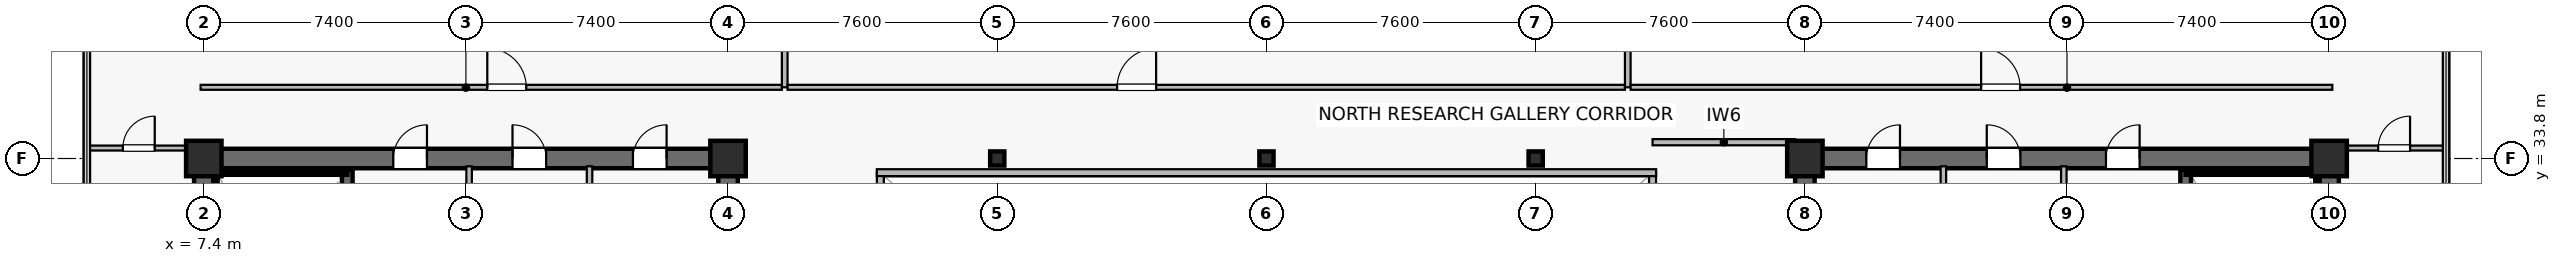
"""IFC4 building model, lengths in metres.
Left out: names, types, materials, properties, quantities, classifications, styles, units other than length and angle.
Written with IfcOpenShell. Run it as: python <this file> out.ifc"""

import sys

from ifc_helpers import new_model, si_unit, direction, frame, frame_2d, origin, origin_2d, place, context, subcontext, project, spatial, rectangle, hollow_rectangle, extrude, source, transform, mapped, element, fill, save


model = new_model("IFC4")
c1 = context("Model", 3, precision=1e-05, world=origin(), true_north=direction((0.0, 1.0)))
c2 = subcontext(c1, "Body", "Model", "MODEL_VIEW")
j1 = project(units=[si_unit("LENGTHUNIT", "METRE"), si_unit("PLANEANGLEUNIT", "RADIAN")], contexts=[c1])
p1 = place(None, origin())
s1 = spatial("IfcSite", under=j1, at=p1, CompositionType="ELEMENT")
p2 = place(p1, origin())
s2 = spatial("IfcBuilding", under=s1, at=p2, CompositionType="ELEMENT")
p3 = place(p2, frame((0.0, 0.0, 205.5)))
s3 = spatial("IfcBuildingStorey", under=s2, at=p3, CompositionType="ELEMENT", Elevation=205.5)
p4 = place(p3, frame((7.125, 33.8, 0.0), z_axis=(0.0, 0.0, 1.0), x_axis=(1.0, 0.0, 0.0)))
e1 = element("IfcWall", 1, at=p4, inside=s3, PredefinedType="SHEAR", context=c2, shape_type="SweptSolid", body=[
    extrude(rectangle(XDim=15.35, YDim=0.55, at=frame_2d((7.675, 0.0))), origin(), (0.0, 0.0, 1.0), 3.8),
])
p5 = place(p4, frame((5.625, 0.0, 0.0)))
e2 = element("IfcOpeningElement", 2, at=p5, cuts=e1, PredefinedType="OPENING", context=c2, shape_type="SweptSolid", body=[
    extrude(rectangle(XDim=0.95, YDim=2.15, at=frame_2d((0.475, 1.075))), frame((0.0, 0.285, 0.0), z_axis=(0.0, -1.0, 0.0), x_axis=(1.0, 0.0, 0.0)), (0.0, 0.0, 1.0), 0.57),
])
p6 = place(p4, frame((8.99, 0.0, 0.0)))
e3 = element("IfcOpeningElement", 3, at=p6, cuts=e1, PredefinedType="OPENING", context=c2, shape_type="SweptSolid", body=[
    extrude(rectangle(XDim=0.95, YDim=2.15, at=frame_2d((0.475, 1.075))), frame((0.0, 0.285, 0.0), z_axis=(0.0, -1.0, 0.0), x_axis=(1.0, 0.0, 0.0)), (0.0, 0.0, 1.0), 0.57),
])
p7 = place(p4, frame((12.39, 0.0, 0.0)))
e4 = element("IfcOpeningElement", 4, at=p7, cuts=e1, PredefinedType="OPENING", context=c2, shape_type="SweptSolid", body=[
    extrude(rectangle(XDim=0.95, YDim=2.15, at=frame_2d((0.475, 1.075))), frame((0.0, 0.285, 0.0), z_axis=(0.0, -1.0, 0.0), x_axis=(1.0, 0.0, 0.0)), (0.0, 0.0, 1.0), 0.57),
])
p8 = place(p3, frame((7.4, 15.075, 0.0), z_axis=(0.0, 0.0, 1.0), x_axis=(0.0, 1.0, 0.0)))
e5 = element("IfcWall", 5, at=p8, inside=s3, PredefinedType="SHEAR", context=c2, shape_type="SweptSolid", body=[
    extrude(rectangle(XDim=18.45, YDim=0.55, at=frame_2d((9.225, 0.0))), origin(), (0.0, 0.0, 1.0), 3.8),
])
p9 = place(p3, frame((22.2, 15.075, 0.0), z_axis=(0.0, 0.0, 1.0), x_axis=(0.0, 1.0, 0.0)))
e6 = element("IfcWall", 6, at=p9, inside=s3, PredefinedType="SHEAR", context=c2, shape_type="SweptSolid", body=[
    extrude(rectangle(XDim=18.45, YDim=0.55, at=frame_2d((9.225, 0.0))), origin(), (0.0, 0.0, 1.0), 3.8),
])
p10 = place(p9, frame((3.475, 0.0, 0.0)))
e7 = element("IfcOpeningElement", 7, at=p10, cuts=e6, PredefinedType="OPENING", context=c2, shape_type="SweptSolid", body=[
    extrude(rectangle(XDim=1.42, YDim=2.2, at=frame_2d((0.71, 1.1))), frame((0.0, 0.285, 0.0), z_axis=(0.0, -1.0, 0.0), x_axis=(1.0, 0.0, 0.0)), (0.0, 0.0, 1.0), 0.57),
])
p11 = place(p3, frame((11.45, 24.85, 0.0), z_axis=(0.0, 0.0, 1.0), x_axis=(0.0, 1.0, 0.0)))
e8 = element("IfcWall", 8, at=p11, inside=s3, PredefinedType="SHEAR", context=c2, shape_type="SweptSolid", body=[
    extrude(rectangle(XDim=8.63, YDim=0.3, at=frame_2d((4.315, 0.0))), origin(), (0.0, 0.0, 1.0), 3.8),
])
p12 = place(p11, frame((0.42, 0.0, 0.0)))
e9 = element("IfcOpeningElement", 9, at=p12, cuts=e8, PredefinedType="OPENING", context=c2, shape_type="SweptSolid", body=[
    extrude(rectangle(XDim=1.1, YDim=2.15, at=frame_2d((0.55, 1.075))), frame((0.0, 0.16, 0.0), z_axis=(0.0, -1.0, 0.0), x_axis=(1.0, 0.0, 0.0)), (0.0, 0.0, 1.0), 0.32),
])
p13 = place(p3, frame((7.73, 33.4, 0.0), z_axis=(0.0, 0.0, 1.0), x_axis=(1.0, 0.0, 0.0)))
e10 = element("IfcWall", 10, at=p13, inside=s3, PredefinedType="SOLIDWALL", context=c2, shape_type="SweptSolid", body=[
    extrude(rectangle(XDim=3.72, YDim=0.12, at=frame_2d((1.86, 0.0))), origin(), (0.0, 0.0, 1.0), 3.8),
])
p14 = place(p3, frame((7.73, 25.0, 0.0), z_axis=(0.0, 0.0, 1.0), x_axis=(0.0, 1.0, 0.0)))
e11 = element("IfcWall", 11, at=p14, inside=s3, PredefinedType="SOLIDWALL", context=c2, shape_type="SweptSolid", body=[
    extrude(rectangle(XDim=8.32, YDim=0.12, at=frame_2d((4.16, 0.0))), origin(), (0.0, 0.0, 1.0), 3.8),
])
p15 = place(p3, frame((52.325, 33.8, 0.0), z_axis=(0.0, 0.0, 1.0), x_axis=(1.0, 0.0, 0.0)))
e12 = element("IfcWall", 12, at=p15, inside=s3, PredefinedType="SHEAR", context=c2, shape_type="SweptSolid", body=[
    extrude(rectangle(XDim=15.35, YDim=0.55, at=frame_2d((7.675, 0.0))), origin(), (0.0, 0.0, 1.0), 3.8),
])
p16 = place(p15, frame((8.775, 0.0, 0.0)))
e13 = element("IfcOpeningElement", 13, at=p16, cuts=e12, PredefinedType="OPENING", context=c2, shape_type="SweptSolid", body=[
    extrude(rectangle(XDim=0.95, YDim=2.15, at=frame_2d((0.475, 1.075))), frame((0.0, 0.285, 0.0), z_axis=(0.0, -1.0, 0.0), x_axis=(1.0, 0.0, 0.0)), (0.0, 0.0, 1.0), 0.57),
])
p17 = place(p15, frame((5.41, 0.0, 0.0)))
e14 = element("IfcOpeningElement", 14, at=p17, cuts=e12, PredefinedType="OPENING", context=c2, shape_type="SweptSolid", body=[
    extrude(rectangle(XDim=0.95, YDim=2.15, at=frame_2d((0.475, 1.075))), frame((0.0, 0.285, 0.0), z_axis=(0.0, -1.0, 0.0), x_axis=(1.0, 0.0, 0.0)), (0.0, 0.0, 1.0), 0.57),
])
p18 = place(p15, frame((2.01, 0.0, 0.0)))
e15 = element("IfcOpeningElement", 15, at=p18, cuts=e12, PredefinedType="OPENING", context=c2, shape_type="SweptSolid", body=[
    extrude(rectangle(XDim=0.95, YDim=2.15, at=frame_2d((0.475, 1.075))), frame((0.0, 0.285, 0.0), z_axis=(0.0, -1.0, 0.0), x_axis=(1.0, 0.0, 0.0)), (0.0, 0.0, 1.0), 0.57),
])
p19 = place(p3, frame((52.6, 15.075, 0.0), z_axis=(0.0, 0.0, 1.0), x_axis=(0.0, 1.0, 0.0)))
e16 = element("IfcWall", 16, at=p19, inside=s3, PredefinedType="SHEAR", context=c2, shape_type="SweptSolid", body=[
    extrude(rectangle(XDim=18.45, YDim=0.55, at=frame_2d((9.225, 0.0))), origin(), (0.0, 0.0, 1.0), 3.8),
])
p20 = place(p19, frame((3.475, 0.0, 0.0)))
e17 = element("IfcOpeningElement", 17, at=p20, cuts=e16, PredefinedType="OPENING", context=c2, shape_type="SweptSolid", body=[
    extrude(rectangle(XDim=1.42, YDim=2.2, at=frame_2d((0.71, 1.1))), frame((0.0, 0.285, 0.0), z_axis=(0.0, -1.0, 0.0), x_axis=(1.0, 0.0, 0.0)), (0.0, 0.0, 1.0), 0.57),
])
p21 = place(p3, frame((67.4, 15.075, 0.0), z_axis=(0.0, 0.0, 1.0), x_axis=(0.0, 1.0, 0.0)))
e18 = element("IfcWall", 18, at=p21, inside=s3, PredefinedType="SHEAR", context=c2, shape_type="SweptSolid", body=[
    extrude(rectangle(XDim=18.45, YDim=0.55, at=frame_2d((9.225, 0.0))), origin(), (0.0, 0.0, 1.0), 3.8),
])
p22 = place(p3, frame((63.35, 24.85, 0.0), z_axis=(0.0, 0.0, 1.0), x_axis=(0.0, 1.0, 0.0)))
e19 = element("IfcWall", 19, at=p22, inside=s3, PredefinedType="SHEAR", context=c2, shape_type="SweptSolid", body=[
    extrude(rectangle(XDim=8.63, YDim=0.3, at=frame_2d((4.315, 0.0))), origin(), (0.0, 0.0, 1.0), 3.8),
])
p23 = place(p22, frame((0.42, 0.0, 0.0)))
e20 = element("IfcOpeningElement", 20, at=p23, cuts=e19, PredefinedType="OPENING", context=c2, shape_type="SweptSolid", body=[
    extrude(rectangle(XDim=1.1, YDim=2.15, at=frame_2d((0.55, 1.075))), frame((0.0, 0.16, 0.0), z_axis=(0.0, -1.0, 0.0), x_axis=(1.0, 0.0, 0.0)), (0.0, 0.0, 1.0), 0.32),
])
p24 = place(p3, frame((63.35, 33.4, 0.0), z_axis=(0.0, 0.0, 1.0), x_axis=(1.0, 0.0, 0.0)))
e21 = element("IfcWall", 21, at=p24, inside=s3, PredefinedType="SOLIDWALL", context=c2, shape_type="SweptSolid", body=[
    extrude(rectangle(XDim=3.72, YDim=0.12, at=frame_2d((1.86, 0.0))), origin(), (0.0, 0.0, 1.0), 3.8),
])
p25 = place(p3, frame((67.07, 25.0, 0.0), z_axis=(0.0, 0.0, 1.0), x_axis=(0.0, 1.0, 0.0)))
e22 = element("IfcWall", 22, at=p25, inside=s3, PredefinedType="SOLIDWALL", context=c2, shape_type="SweptSolid", body=[
    extrude(rectangle(XDim=8.32, YDim=0.12, at=frame_2d((4.16, 0.0))), origin(), (0.0, 0.0, 1.0), 3.8),
])
m1 = source(origin(), c2, "Body", "SweptSolid", [
    extrude(rectangle(XDim=1.0, YDim=1.0, at=origin_2d()), origin(), (0.0, 0.0, 1.0), 4.1),
])
for number, where, z_axis, x_axis in (
    (23, (7.4, 33.8, 0.0), (0.0, 0.0, 1.0), (1.0, 0.0, 0.0)),
    (24, (22.2, 33.8, 0.0), (0.0, 0.0, 1.0), (1.0, 0.0, 0.0)),
    (25, (52.6, 33.8, 0.0), (0.0, 0.0, 1.0), (1.0, 0.0, 0.0)),
    (26, (67.4, 33.8, 0.0), (0.0, 0.0, 1.0), (1.0, 0.0, 0.0)),
):
    element("IfcColumn", number, at=place(p3, frame(where, z_axis=z_axis, x_axis=x_axis)), inside=s3, PredefinedType="COLUMN", context=c2, shape_type="MappedRepresentation", body=[
        mapped(m1, transform((0.0, 0.0, 0.0), scale=1.0)),
    ])
m2 = source(origin(), c2, "Body", "SweptSolid", [
    extrude(hollow_rectangle(XDim=0.4, YDim=0.4, WallThickness=0.019, at=origin_2d()), origin(), (0.0, 0.0, 1.0), 4.1),
])
for number, where, z_axis, x_axis in (
    (27, (29.8, 33.8, 0.0), (0.0, 0.0, 1.0), (1.0, 0.0, 0.0)),
    (28, (37.4, 33.8, 0.0), (0.0, 0.0, 1.0), (1.0, 0.0, 0.0)),
    (29, (45.0, 33.8, 0.0), (0.0, 0.0, 1.0), (1.0, 0.0, 0.0)),
):
    element("IfcColumn", number, at=place(p3, frame(where, z_axis=z_axis, x_axis=x_axis)), inside=s3, PredefinedType="COLUMN", context=c2, shape_type="MappedRepresentation", body=[
        mapped(m2, transform((0.0, 0.0, 0.0), scale=1.0)),
    ])
p26 = place(p3, frame((14.89, 29.65, 0.0), z_axis=(0.0, 0.0, 1.0), x_axis=(0.0, 1.0, 0.0)))
e30 = element("IfcWall", 30, at=p26, inside=s3, PredefinedType="PLUMBINGWALL", context=c2, shape_type="SweptSolid", body=[
    extrude(rectangle(XDim=3.93, YDim=0.155, at=frame_2d((1.965, 0.0))), origin(), (0.0, 0.0, 1.0), 3.197),
])
p27 = place(p3, frame((18.29, 29.65, 0.0), z_axis=(0.0, 0.0, 1.0), x_axis=(0.0, 1.0, 0.0)))
e31 = element("IfcWall", 31, at=p27, inside=s3, PredefinedType="PLUMBINGWALL", context=c2, shape_type="SweptSolid", body=[
    extrude(rectangle(XDim=3.93, YDim=0.155, at=frame_2d((1.965, 0.0))), origin(), (0.0, 0.0, 1.0), 3.8),
])
p28 = place(p3, frame((59.91, 29.65, 0.0), z_axis=(0.0, 0.0, 1.0), x_axis=(0.0, 1.0, 0.0)))
e32 = element("IfcWall", 32, at=p28, inside=s3, PredefinedType="PLUMBINGWALL", context=c2, shape_type="SweptSolid", body=[
    extrude(rectangle(XDim=3.93, YDim=0.155, at=frame_2d((1.965, 0.0))), origin(), (0.0, 0.0, 1.0), 3.197),
])
p29 = place(p3, frame((56.51, 29.65, 0.0), z_axis=(0.0, 0.0, 1.0), x_axis=(0.0, 1.0, 0.0)))
e33 = element("IfcWall", 33, at=p29, inside=s3, PredefinedType="PLUMBINGWALL", context=c2, shape_type="SweptSolid", body=[
    extrude(rectangle(XDim=3.93, YDim=0.155, at=frame_2d((1.965, 0.0))), origin(), (0.0, 0.0, 1.0), 3.8),
])
p30 = place(p3, frame((48.3, 34.26, 0.0), z_axis=(0.0, 0.0, 1.0), x_axis=(1.0, 0.0, 0.0)))
e34 = element("IfcWall", 34, at=p30, inside=s3, PredefinedType="PARTITIONING", context=c2, shape_type="SweptSolid", body=[
    extrude(rectangle(XDim=4.025, YDim=0.175, at=frame_2d((2.012, 0.0))), origin(), (0.0, 0.0, 1.0), 3.485),
])
p31 = place(p3, frame((26.5, 15.2, 0.0), z_axis=(0.0, 0.0, 1.0), x_axis=(0.0, 1.0, 0.0)))
e35 = element("IfcWall", 35, at=p31, inside=s3, PredefinedType="SOLIDWALL", context=c2, shape_type="SweptSolid", body=[
    extrude(rectangle(XDim=18.2, YDim=0.195, at=frame_2d((9.1, 0.0))), origin(), (0.0, 0.0, 1.0), 3.8),
])
p32 = place(p31, frame((1.8, 0.0, 0.9)))
e36 = element("IfcOpeningElement", 36, at=p32, cuts=e35, PredefinedType="OPENING", context=c2, shape_type="SweptSolid", body=[
    extrude(rectangle(XDim=1.2, YDim=1.35, at=frame_2d((0.6, 0.675))), frame((0.0, 0.107, 0.0), z_axis=(0.0, -1.0, 0.0), x_axis=(1.0, 0.0, 0.0)), (0.0, 0.0, 1.0), 0.215),
])
p33 = place(p31, frame((13.2, 0.0, 0.9)))
e37 = element("IfcOpeningElement", 37, at=p33, cuts=e35, PredefinedType="OPENING", context=c2, shape_type="SweptSolid", body=[
    extrude(rectangle(XDim=1.2, YDim=1.35, at=frame_2d((0.6, 0.675))), frame((0.0, 0.107, 0.0), z_axis=(0.0, -1.0, 0.0), x_axis=(1.0, 0.0, 0.0)), (0.0, 0.0, 1.0), 0.215),
])
p34 = place(p3, frame((48.3, 15.2, 0.0), z_axis=(0.0, 0.0, 1.0), x_axis=(0.0, 1.0, 0.0)))
e38 = element("IfcWall", 38, at=p34, inside=s3, PredefinedType="SOLIDWALL", context=c2, shape_type="SweptSolid", body=[
    extrude(rectangle(XDim=18.2, YDim=0.195, at=frame_2d((9.1, 0.0))), origin(), (0.0, 0.0, 1.0), 3.8),
])
p35 = place(p34, frame((1.8, 0.0, 0.9)))
e39 = element("IfcOpeningElement", 39, at=p35, cuts=e38, PredefinedType="OPENING", context=c2, shape_type="SweptSolid", body=[
    extrude(rectangle(XDim=1.2, YDim=1.35, at=frame_2d((0.6, 0.675))), frame((0.0, 0.107, 0.0), z_axis=(0.0, -1.0, 0.0), x_axis=(1.0, 0.0, 0.0)), (0.0, 0.0, 1.0), 0.215),
])
p36 = place(p34, frame((13.2, 0.0, 0.9)))
e40 = element("IfcOpeningElement", 40, at=p36, cuts=e38, PredefinedType="OPENING", context=c2, shape_type="SweptSolid", body=[
    extrude(rectangle(XDim=1.2, YDim=1.35, at=frame_2d((0.6, 0.675))), frame((0.0, 0.107, 0.0), z_axis=(0.0, -1.0, 0.0), x_axis=(1.0, 0.0, 0.0)), (0.0, 0.0, 1.0), 0.215),
])
p37 = place(p3, frame((26.4, 33.4, 0.0), z_axis=(0.0, 0.0, 1.0), x_axis=(1.0, 0.0, 0.0)))
e41 = element("IfcWall", 41, at=p37, inside=s3, PredefinedType="SOLIDWALL", context=c2, shape_type="SweptSolid", body=[
    extrude(rectangle(XDim=22.0, YDim=0.195, at=frame_2d((11.0, 0.0))), origin(), (0.0, 0.0, 1.0), 3.8),
])
p38 = place(p3, frame((7.31, 35.81, 0.0), z_axis=(0.0, 0.0, 1.0), x_axis=(1.0, 0.0, 0.0)))
e42 = element("IfcWall", 42, at=p38, inside=s3, PredefinedType="PARTITIONING", context=c2, shape_type="SweptSolid", body=[
    extrude(rectangle(XDim=16.41, YDim=0.14, at=frame_2d((8.205, 0.0))), origin(), (0.0, 0.0, 1.0), 3.197),
])
p39 = place(p38, frame((8.093, 0.0, 0.0)))
e43 = element("IfcOpeningElement", 43, at=p39, cuts=e42, PredefinedType="OPENING", context=c2, shape_type="SweptSolid", body=[
    extrude(rectangle(XDim=1.1, YDim=2.18, at=frame_2d((0.55, 1.09))), frame((0.0, 0.08, 0.0), z_axis=(0.0, -1.0, 0.0), x_axis=(1.0, 0.0, 0.0)), (0.0, 0.0, 1.0), 0.16),
])
p40 = place(p3, frame((23.8, 35.81, 0.0), z_axis=(0.0, 0.0, 1.0), x_axis=(0.0, 1.0, 0.0)))
e44 = element("IfcWall", 44, at=p40, inside=s3, PredefinedType="PARTITIONING", context=c2, shape_type="SweptSolid", body=[
    extrude(rectangle(XDim=10.08, YDim=0.16, at=frame_2d((5.04, 0.0))), origin(), (0.0, 0.0, 1.0), 3.135),
])
p41 = place(p3, frame((23.88, 35.81, 0.0), z_axis=(0.0, 0.0, 1.0), x_axis=(1.0, 0.0, 0.0)))
e45 = element("IfcWall", 45, at=p41, inside=s3, PredefinedType="PARTITIONING", context=c2, shape_type="SweptSolid", body=[
    extrude(rectangle(XDim=23.64, YDim=0.14, at=frame_2d((11.82, 0.0))), origin(), (0.0, 0.0, 1.0), 3.197),
])
p42 = place(p41, frame((9.304, 0.0, 0.0)))
e46 = element("IfcOpeningElement", 46, at=p42, cuts=e45, PredefinedType="OPENING", context=c2, shape_type="SweptSolid", body=[
    extrude(rectangle(XDim=1.1, YDim=2.18, at=frame_2d((0.55, 1.09))), frame((0.0, 0.08, 0.0), z_axis=(0.0, -1.0, 0.0), x_axis=(1.0, 0.0, 0.0)), (0.0, 0.0, 1.0), 0.16),
])
p43 = place(p3, frame((47.6, 35.81, 0.0), z_axis=(0.0, 0.0, 1.0), x_axis=(0.0, 1.0, 0.0)))
e47 = element("IfcWall", 47, at=p43, inside=s3, PredefinedType="PARTITIONING", context=c2, shape_type="SweptSolid", body=[
    extrude(rectangle(XDim=8.88, YDim=0.16, at=frame_2d((4.44, 0.0))), origin(), (0.0, 0.0, 1.0), 3.135),
])
p44 = place(p3, frame((47.68, 35.81, 0.0), z_axis=(0.0, 0.0, 1.0), x_axis=(1.0, 0.0, 0.0)))
e48 = element("IfcWall", 48, at=p44, inside=s3, PredefinedType="PARTITIONING", context=c2, shape_type="SweptSolid", body=[
    extrude(rectangle(XDim=19.81, YDim=0.14, at=frame_2d((9.905, 0.0))), origin(), (0.0, 0.0, 1.0), 3.197),
])
p45 = place(p44, frame((9.895, 0.0, 0.0)))
e49 = element("IfcOpeningElement", 49, at=p45, cuts=e48, PredefinedType="OPENING", context=c2, shape_type="SweptSolid", body=[
    extrude(rectangle(XDim=1.1, YDim=2.18, at=frame_2d((0.55, 1.09))), frame((0.0, 0.08, 0.0), z_axis=(0.0, -1.0, 0.0), x_axis=(1.0, 0.0, 0.0)), (0.0, 0.0, 1.0), 0.16),
])
p46 = place(p3, frame((4.11, 34.095, 0.0), z_axis=(0.0, 0.0, 1.0), x_axis=(1.0, 0.0, 0.0)))
e50 = element("IfcWall", 50, at=p46, inside=s3, PredefinedType="PARTITIONING", context=c2, shape_type="SweptSolid", body=[
    extrude(rectangle(XDim=2.91, YDim=0.14, at=frame_2d((1.455, 0.0))), origin(), (0.0, 0.0, 1.0), 3.8),
])
p47 = place(p46, frame((1.005, 0.0, 0.0)))
e51 = element("IfcOpeningElement", 51, at=p47, cuts=e50, PredefinedType="OPENING", context=c2, shape_type="SweptSolid", body=[
    extrude(rectangle(XDim=0.9, YDim=2.1, at=frame_2d((0.45, 1.05))), frame((0.0, 0.08, 0.0), z_axis=(0.0, -1.0, 0.0), x_axis=(1.0, 0.0, 0.0)), (0.0, 0.0, 1.0), 0.16),
])
p48 = place(p3, frame((67.78, 34.095, 0.0), z_axis=(0.0, 0.0, 1.0), x_axis=(1.0, 0.0, 0.0)))
e52 = element("IfcWall", 52, at=p48, inside=s3, PredefinedType="PARTITIONING", context=c2, shape_type="SweptSolid", body=[
    extrude(rectangle(XDim=2.91, YDim=0.14, at=frame_2d((1.455, 0.0))), origin(), (0.0, 0.0, 1.0), 3.8),
])
p49 = place(p48, frame((1.005, 0.0, 0.0)))
e53 = element("IfcOpeningElement", 53, at=p49, cuts=e52, PredefinedType="OPENING", context=c2, shape_type="SweptSolid", body=[
    extrude(rectangle(XDim=0.9, YDim=2.1, at=frame_2d((0.45, 1.05))), frame((0.0, 0.08, 0.0), z_axis=(0.0, -1.0, 0.0), x_axis=(1.0, 0.0, 0.0)), (0.0, 0.0, 1.0), 0.16),
])
m3 = source(origin(), c2, "Body", "SweptSolid", [
    extrude(rectangle(XDim=0.95, YDim=2.15, at=frame_2d((0.475, 1.075))), frame((0.0, 0.025, 0.0), z_axis=(0.0, -1.0, 0.0), x_axis=(1.0, 0.0, 0.0)), (0.0, 0.0, 1.0), 0.05),
])
p50 = place(p5, origin())
e54 = element("IfcDoor", 54, at=p50, inside=s3, OperationType="SINGLE_SWING_RIGHT", PredefinedType="DOOR", context=c2, shape_type="MappedRepresentation", body=[
    mapped(m3, transform((0.0, 0.0, 0.0), scale=1.0)),
])
fill(e2, e54)
p51 = place(p6, origin())
e55 = element("IfcDoor", 55, at=p51, inside=s3, OperationType="SINGLE_SWING_LEFT", PredefinedType="DOOR", context=c2, shape_type="MappedRepresentation", body=[
    mapped(m3, transform((0.0, 0.0, 0.0), scale=1.0)),
])
fill(e3, e55)
p52 = place(p7, origin())
e56 = element("IfcDoor", 56, at=p52, inside=s3, OperationType="SINGLE_SWING_RIGHT", PredefinedType="DOOR", context=c2, shape_type="MappedRepresentation", body=[
    mapped(m3, transform((0.0, 0.0, 0.0), scale=1.0)),
])
fill(e4, e56)
p53 = place(p16, origin())
e57 = element("IfcDoor", 57, at=p53, inside=s3, OperationType="SINGLE_SWING_RIGHT", PredefinedType="DOOR", context=c2, shape_type="MappedRepresentation", body=[
    mapped(m3, transform((0.0, 0.0, 0.0), scale=1.0)),
])
fill(e13, e57)
p54 = place(p17, origin())
e58 = element("IfcDoor", 58, at=p54, inside=s3, OperationType="SINGLE_SWING_LEFT", PredefinedType="DOOR", context=c2, shape_type="MappedRepresentation", body=[
    mapped(m3, transform((0.0, 0.0, 0.0), scale=1.0)),
])
fill(e14, e58)
p55 = place(p18, origin())
e59 = element("IfcDoor", 59, at=p55, inside=s3, OperationType="SINGLE_SWING_RIGHT", PredefinedType="DOOR", context=c2, shape_type="MappedRepresentation", body=[
    mapped(m3, transform((0.0, 0.0, 0.0), scale=1.0)),
])
fill(e15, e59)
m4 = source(origin(), c2, "Body", "SweptSolid", [
    extrude(rectangle(XDim=1.1, YDim=2.18, at=frame_2d((0.55, 1.09))), frame((0.0, 0.025, 0.0), z_axis=(0.0, -1.0, 0.0), x_axis=(1.0, 0.0, 0.0)), (0.0, 0.0, 1.0), 0.05),
])
p56 = place(p39, origin())
e60 = element("IfcDoor", 60, at=p56, inside=s3, OperationType="SINGLE_SWING_LEFT", PredefinedType="DOOR", context=c2, shape_type="MappedRepresentation", body=[
    mapped(m4, transform((0.0, 0.0, 0.0), scale=1.0)),
])
fill(e43, e60)
p57 = place(p42, origin())
e61 = element("IfcDoor", 61, at=p57, inside=s3, OperationType="SINGLE_SWING_RIGHT", PredefinedType="DOOR", context=c2, shape_type="MappedRepresentation", body=[
    mapped(m4, transform((0.0, 0.0, 0.0), scale=1.0)),
])
fill(e46, e61)
p58 = place(p45, origin())
e62 = element("IfcDoor", 62, at=p58, inside=s3, OperationType="SINGLE_SWING_LEFT", PredefinedType="DOOR", context=c2, shape_type="MappedRepresentation", body=[
    mapped(m4, transform((0.0, 0.0, 0.0), scale=1.0)),
])
fill(e49, e62)
m5 = source(origin(), c2, "Body", "SweptSolid", [
    extrude(rectangle(XDim=0.9, YDim=2.1, at=frame_2d((0.45, 1.05))), frame((0.0, 0.025, 0.0), z_axis=(0.0, -1.0, 0.0), x_axis=(1.0, 0.0, 0.0)), (0.0, 0.0, 1.0), 0.05),
])
p59 = place(p47, origin())
e63 = element("IfcDoor", 63, at=p59, inside=s3, OperationType="SINGLE_SWING_RIGHT", PredefinedType="DOOR", context=c2, shape_type="MappedRepresentation", body=[
    mapped(m5, transform((0.0, 0.0, 0.0), scale=1.0)),
])
fill(e51, e63)
p60 = place(p49, origin())
e64 = element("IfcDoor", 64, at=p60, inside=s3, OperationType="SINGLE_SWING_RIGHT", PredefinedType="DOOR", context=c2, shape_type="MappedRepresentation", body=[
    mapped(m5, transform((0.0, 0.0, 0.0), scale=1.0)),
])
fill(e53, e64)
save(model, sys.argv[1])
